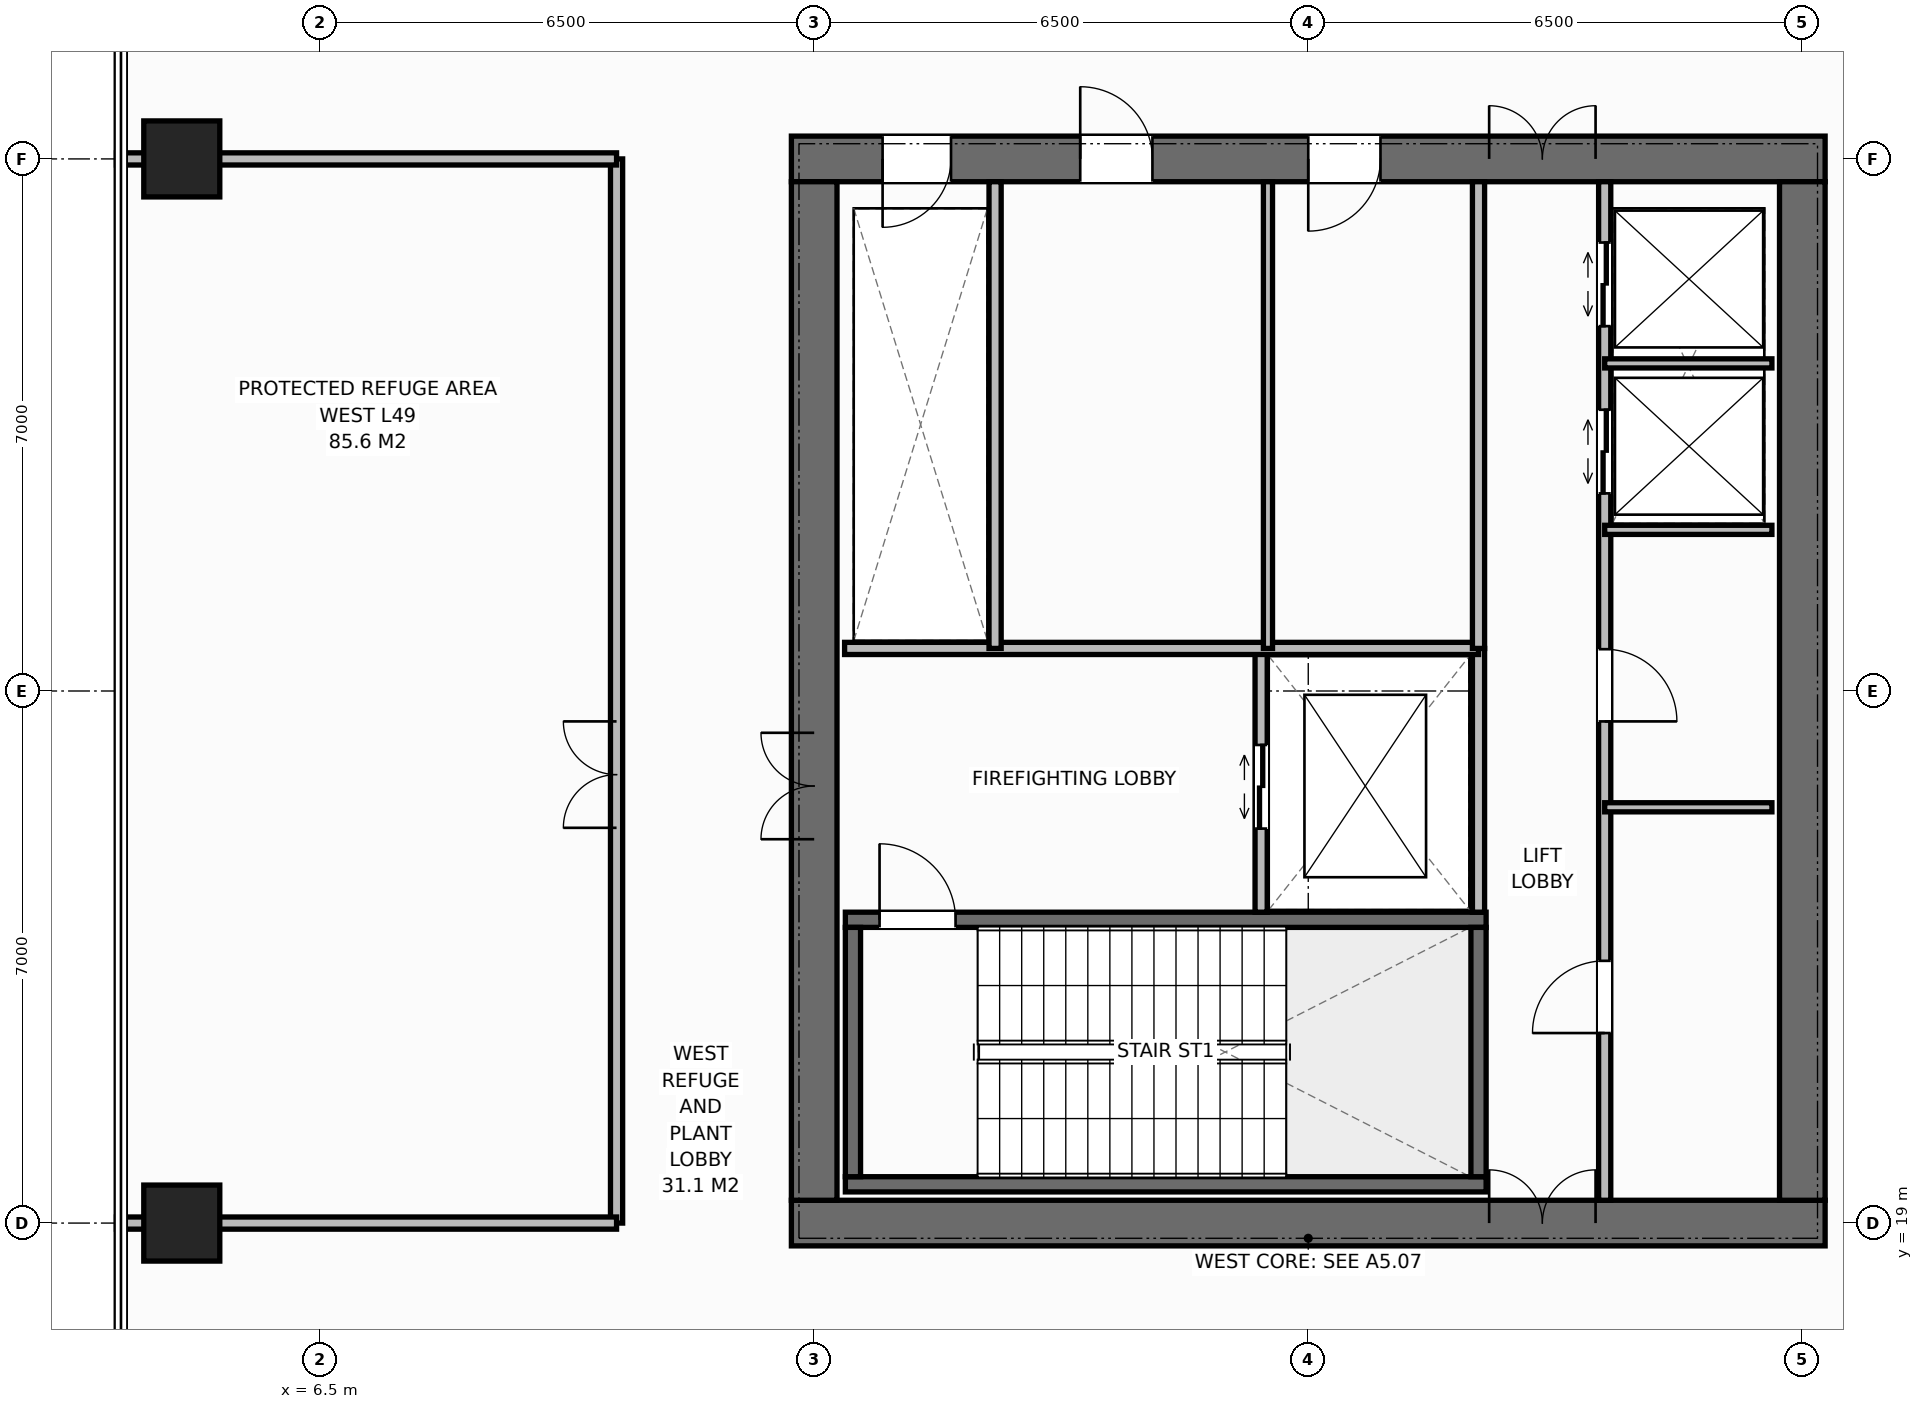
"""IFC4 building model, lengths in metres.
Left out: names, types, materials, properties, quantities, classifications, styles, units other than length and angle.
Written with IfcOpenShell. Run it as: python <this file> out.ifc"""

import sys

from ifc_helpers import new_model, si_unit, direction, frame, frame_2d, origin, origin_2d, place, context, subcontext, project, spatial, rectangle, extrude, element, fill, save


model = new_model("IFC4")
c1 = context("Model", 3, precision=1e-05, world=origin(), true_north=direction((0.0, 1.0)))
c2 = subcontext(c1, "Body", "Model", "MODEL_VIEW")
j1 = project(units=[si_unit("LENGTHUNIT", "METRE"), si_unit("PLANEANGLEUNIT", "RADIAN")], contexts=[c1])
p1 = place(None, origin())
s1 = spatial("IfcSite", under=j1, at=p1, CompositionType="ELEMENT")
p2 = place(p1, origin())
s2 = spatial("IfcBuilding", under=s1, at=p2, CompositionType="ELEMENT")
p3 = place(p2, frame((0.0, 0.0, 197.4)))
s3 = spatial("IfcBuildingStorey", under=s2, at=p3, CompositionType="ELEMENT", Elevation=197.4)
p4 = place(p3, frame((12.7, 19.0, 0.0), z_axis=(0.0, 0.0, 1.0), x_axis=(1.0, 0.0, 0.0)))
e1 = element("IfcWall", 1, at=p4, inside=s3, PredefinedType="SHEAR", context=c2, shape_type="SweptSolid", body=[
    extrude(rectangle(XDim=13.6, YDim=0.6, at=frame_2d((6.8, 0.0))), origin(), (0.0, 0.0, 1.0), 5.0),
])
p5 = place(p4, frame((9.18, 0.0, 0.0)))
e2 = element("IfcOpeningElement", 2, at=p5, cuts=e1, PredefinedType="OPENING", context=c2, shape_type="SweptSolid", body=[
    extrude(rectangle(XDim=1.4, YDim=2.2, at=frame_2d((0.7, 1.1))), frame((0.0, 0.31, 0.0), z_axis=(0.0, -1.0, 0.0), x_axis=(1.0, 0.0, 0.0)), (0.0, 0.0, 1.0), 0.62),
])
p6 = place(p3, frame((12.7, 33.0, 0.0), z_axis=(0.0, 0.0, 1.0), x_axis=(1.0, 0.0, 0.0)))
e3 = element("IfcWall", 3, at=p6, inside=s3, PredefinedType="SHEAR", context=c2, shape_type="SweptSolid", body=[
    extrude(rectangle(XDim=13.6, YDim=0.6, at=frame_2d((6.8, 0.0))), origin(), (0.0, 0.0, 1.0), 5.0),
])
p7 = place(p6, frame((1.2, 0.0, 0.0)))
e4 = element("IfcOpeningElement", 4, at=p7, cuts=e3, PredefinedType="OPENING", context=c2, shape_type="SweptSolid", body=[
    extrude(rectangle(XDim=0.9, YDim=2.15, at=frame_2d((0.45, 1.075))), frame((0.0, 0.31, 0.0), z_axis=(0.0, -1.0, 0.0), x_axis=(1.0, 0.0, 0.0)), (0.0, 0.0, 1.0), 0.62),
])
p8 = place(p6, frame((3.8, 0.0, 0.0)))
e5 = element("IfcOpeningElement", 5, at=p8, cuts=e3, PredefinedType="OPENING", context=c2, shape_type="SweptSolid", body=[
    extrude(rectangle(XDim=0.95, YDim=2.15, at=frame_2d((0.475, 1.075))), frame((0.0, 0.31, 0.0), z_axis=(0.0, -1.0, 0.0), x_axis=(1.0, 0.0, 0.0)), (0.0, 0.0, 1.0), 0.62),
])
p9 = place(p6, frame((6.8, 0.0, 0.0)))
e6 = element("IfcOpeningElement", 6, at=p9, cuts=e3, PredefinedType="OPENING", context=c2, shape_type="SweptSolid", body=[
    extrude(rectangle(XDim=0.95, YDim=2.15, at=frame_2d((0.475, 1.075))), frame((0.0, 0.31, 0.0), z_axis=(0.0, -1.0, 0.0), x_axis=(1.0, 0.0, 0.0)), (0.0, 0.0, 1.0), 0.62),
])
p10 = place(p6, frame((9.18, 0.0, 0.0)))
e7 = element("IfcOpeningElement", 7, at=p10, cuts=e3, PredefinedType="OPENING", context=c2, shape_type="SweptSolid", body=[
    extrude(rectangle(XDim=1.4, YDim=2.2, at=frame_2d((0.7, 1.1))), frame((0.0, 0.31, 0.0), z_axis=(0.0, -1.0, 0.0), x_axis=(1.0, 0.0, 0.0)), (0.0, 0.0, 1.0), 0.62),
])
p11 = place(p3, frame((13.0, 19.3, 0.0), z_axis=(0.0, 0.0, 1.0), x_axis=(0.0, 1.0, 0.0)))
e8 = element("IfcWall", 8, at=p11, inside=s3, PredefinedType="SHEAR", context=c2, shape_type="SweptSolid", body=[
    extrude(rectangle(XDim=13.4, YDim=0.6, at=frame_2d((6.7, 0.0))), origin(), (0.0, 0.0, 1.0), 5.0),
])
p12 = place(p11, frame((4.75, 0.0, 0.0)))
e9 = element("IfcOpeningElement", 9, at=p12, cuts=e8, PredefinedType="OPENING", context=c2, shape_type="SweptSolid", body=[
    extrude(rectangle(XDim=1.4, YDim=2.2, at=frame_2d((0.7, 1.1))), frame((0.0, 0.31, 0.0), z_axis=(0.0, -1.0, 0.0), x_axis=(1.0, 0.0, 0.0)), (0.0, 0.0, 1.0), 0.62),
])
p13 = place(p3, frame((26.0, 19.3, 0.0), z_axis=(0.0, 0.0, 1.0), x_axis=(0.0, 1.0, 0.0)))
e10 = element("IfcWall", 10, at=p13, inside=s3, PredefinedType="SHEAR", context=c2, shape_type="SweptSolid", body=[
    extrude(rectangle(XDim=13.4, YDim=0.6, at=frame_2d((6.7, 0.0))), origin(), (0.0, 0.0, 1.0), 5.0),
])
p14 = place(p3, frame((13.41, 19.51, 0.0), z_axis=(0.0, 0.0, 1.0), x_axis=(1.0, 0.0, 0.0)))
e11 = element("IfcWall", 11, at=p14, inside=s3, PredefinedType="SHEAR", context=c2, shape_type="SweptSolid", body=[
    extrude(rectangle(XDim=8.43, YDim=0.2, at=frame_2d((4.215, 0.0))), origin(), (0.0, 0.0, 1.0), 5.0),
])
p15 = place(p3, frame((13.41, 22.99, 0.0), z_axis=(0.0, 0.0, 1.0), x_axis=(1.0, 0.0, 0.0)))
e12 = element("IfcWall", 12, at=p15, inside=s3, PredefinedType="SHEAR", context=c2, shape_type="SweptSolid", body=[
    extrude(rectangle(XDim=8.43, YDim=0.2, at=frame_2d((4.215, 0.0))), origin(), (0.0, 0.0, 1.0), 5.0),
])
p16 = place(p15, frame((0.45, 0.0, 0.0)))
e13 = element("IfcOpeningElement", 13, at=p16, cuts=e12, PredefinedType="OPENING", context=c2, shape_type="SweptSolid", body=[
    extrude(rectangle(XDim=1.0, YDim=2.15, at=frame_2d((0.5, 1.075))), frame((0.0, 0.11, 0.0), z_axis=(0.0, -1.0, 0.0), x_axis=(1.0, 0.0, 0.0)), (0.0, 0.0, 1.0), 0.22),
])
for number, where, z_axis, x_axis in (
    (14, (13.51, 19.61, 0.0), (0.0, 0.0, 1.0), (0.0, 1.0, 0.0)),
    (15, (21.74, 19.61, 0.0), (0.0, 0.0, 1.0), (0.0, 1.0, 0.0)),
):
    element("IfcWall", number, at=place(p3, frame(where, z_axis=z_axis, x_axis=x_axis)), inside=s3, PredefinedType="SHEAR", context=c2, shape_type="SweptSolid", body=[
        extrude(rectangle(XDim=3.28, YDim=0.2, at=frame_2d((1.64, 0.0))), origin(), (0.0, 0.0, 1.0), 5.0),
    ])
for number, where, z_axis, x_axis in (
    (16, (4.68, 19.0, 0.0), (0.0, 0.0, 1.0), (1.0, 0.0, 0.0)),
    (17, (4.68, 33.0, 0.0), (0.0, 0.0, 1.0), (1.0, 0.0, 0.0)),
):
    element("IfcColumn", number, at=place(p3, frame(where, z_axis=z_axis, x_axis=x_axis)), inside=s3, PredefinedType="COLUMN", context=c2, shape_type="SweptSolid", body=[
        extrude(rectangle(XDim=1.0, YDim=1.0, at=origin_2d()), origin(), (0.0, 0.0, 1.0), 5.0),
    ])
p17 = place(p3, frame((21.74, 23.09, 0.0), z_axis=(0.0, 0.0, 1.0), x_axis=(0.0, 1.0, 0.0)))
e18 = element("IfcWall", 18, at=p17, inside=s3, PredefinedType="STANDARD", context=c2, shape_type="SweptSolid", body=[
    extrude(rectangle(XDim=3.47, YDim=0.16, at=frame_2d((1.735, 0.0))), origin(), (0.0, 0.0, 1.0), 4.78),
])
p18 = place(p3, frame((18.88, 23.09, 0.0), z_axis=(0.0, 0.0, 1.0), x_axis=(0.0, 1.0, 0.0)))
e19 = element("IfcWall", 19, at=p18, inside=s3, PredefinedType="STANDARD", context=c2, shape_type="SweptSolid", body=[
    extrude(rectangle(XDim=3.47, YDim=0.16, at=frame_2d((1.735, 0.0))), origin(), (0.0, 0.0, 1.0), 4.78),
])
p19 = place(p18, frame((1.1, 0.0, 0.0)))
e20 = element("IfcOpeningElement", 20, at=p19, cuts=e19, PredefinedType="OPENING", context=c2, shape_type="SweptSolid", body=[
    extrude(rectangle(XDim=1.1, YDim=2.2, at=frame_2d((0.55, 1.1))), frame((0.0, 0.09, 0.0), z_axis=(0.0, -1.0, 0.0), x_axis=(1.0, 0.0, 0.0)), (0.0, 0.0, 1.0), 0.18),
])
p20 = place(p3, frame((13.4, 26.56, 0.0), z_axis=(0.0, 0.0, 1.0), x_axis=(1.0, 0.0, 0.0)))
e21 = element("IfcWall", 21, at=p20, inside=s3, PredefinedType="STANDARD", context=c2, shape_type="SweptSolid", body=[
    extrude(rectangle(XDim=8.34, YDim=0.16, at=frame_2d((4.17, 0.0))), origin(), (0.0, 0.0, 1.0), 4.78),
])
p21 = place(p3, frame((15.38, 26.56, 0.0), z_axis=(0.0, 0.0, 1.0), x_axis=(0.0, 1.0, 0.0)))
e22 = element("IfcWall", 22, at=p21, inside=s3, PredefinedType="STANDARD", context=c2, shape_type="SweptSolid", body=[
    extrude(rectangle(XDim=6.14, YDim=0.16, at=frame_2d((3.07, 0.0))), origin(), (0.0, 0.0, 1.0), 4.78),
])
p22 = place(p3, frame((18.97, 26.56, 0.0), z_axis=(0.0, 0.0, 1.0), x_axis=(0.0, 1.0, 0.0)))
e23 = element("IfcWall", 23, at=p22, inside=s3, PredefinedType="PARTITIONING", context=c2, shape_type="SweptSolid", body=[
    extrude(rectangle(XDim=6.14, YDim=0.12, at=frame_2d((3.07, 0.0))), origin(), (0.0, 0.0, 1.0), 4.78),
])
p23 = place(p3, frame((21.74, 26.56, 0.0), z_axis=(0.0, 0.0, 1.0), x_axis=(0.0, 1.0, 0.0)))
e24 = element("IfcWall", 24, at=p23, inside=s3, PredefinedType="STANDARD", context=c2, shape_type="SweptSolid", body=[
    extrude(rectangle(XDim=6.14, YDim=0.16, at=frame_2d((3.07, 0.0))), origin(), (0.0, 0.0, 1.0), 4.78),
])
p24 = place(p3, frame((23.4, 19.3, 0.0), z_axis=(0.0, 0.0, 1.0), x_axis=(0.0, 1.0, 0.0)))
e25 = element("IfcWall", 25, at=p24, inside=s3, PredefinedType="STANDARD", context=c2, shape_type="SweptSolid", body=[
    extrude(rectangle(XDim=13.4, YDim=0.16, at=frame_2d((6.7, 0.0))), origin(), (0.0, 0.0, 1.0), 4.78),
])
p25 = place(p24, frame((2.2, 0.0, 0.0)))
e26 = element("IfcOpeningElement", 26, at=p25, cuts=e25, PredefinedType="OPENING", context=c2, shape_type="SweptSolid", body=[
    extrude(rectangle(XDim=0.95, YDim=2.15, at=frame_2d((0.475, 1.075))), frame((0.0, 0.09, 0.0), z_axis=(0.0, -1.0, 0.0), x_axis=(1.0, 0.0, 0.0)), (0.0, 0.0, 1.0), 0.18),
])
p26 = place(p24, frame((6.3, 0.0, 0.0)))
e27 = element("IfcOpeningElement", 27, at=p26, cuts=e25, PredefinedType="OPENING", context=c2, shape_type="SweptSolid", body=[
    extrude(rectangle(XDim=0.95, YDim=2.15, at=frame_2d((0.475, 1.075))), frame((0.0, 0.09, 0.0), z_axis=(0.0, -1.0, 0.0), x_axis=(1.0, 0.0, 0.0)), (0.0, 0.0, 1.0), 0.18),
])
p27 = place(p24, frame((9.3, 0.0, 0.0)))
e28 = element("IfcOpeningElement", 28, at=p27, cuts=e25, PredefinedType="OPENING", context=c2, shape_type="SweptSolid", body=[
    extrude(rectangle(XDim=1.1, YDim=2.2, at=frame_2d((0.55, 1.1))), frame((0.0, 0.09, 0.0), z_axis=(0.0, -1.0, 0.0), x_axis=(1.0, 0.0, 0.0)), (0.0, 0.0, 1.0), 0.18),
])
p28 = place(p24, frame((11.5, 0.0, 0.0)))
e29 = element("IfcOpeningElement", 29, at=p28, cuts=e25, PredefinedType="OPENING", context=c2, shape_type="SweptSolid", body=[
    extrude(rectangle(XDim=1.1, YDim=2.2, at=frame_2d((0.55, 1.1))), frame((0.0, 0.09, 0.0), z_axis=(0.0, -1.0, 0.0), x_axis=(1.0, 0.0, 0.0)), (0.0, 0.0, 1.0), 0.18),
])
for number, where, z_axis, x_axis in (
    (30, (23.4, 24.47, 0.0), (0.0, 0.0, 1.0), (1.0, 0.0, 0.0)),
    (31, (23.4, 28.12, 0.0), (0.0, 0.0, 1.0), (1.0, 0.0, 0.0)),
    (32, (23.4, 30.31, 0.0), (0.0, 0.0, 1.0), (1.0, 0.0, 0.0)),
):
    element("IfcWall", number, at=place(p3, frame(where, z_axis=z_axis, x_axis=x_axis)), inside=s3, PredefinedType="PARTITIONING", context=c2, shape_type="SweptSolid", body=[
        extrude(rectangle(XDim=2.2, YDim=0.12, at=frame_2d((1.1, 0.0))), origin(), (0.0, 0.0, 1.0), 4.78),
    ])
p29 = place(p3, frame((10.4, 19.0, 0.0), z_axis=(0.0, 0.0, 1.0), x_axis=(0.0, 1.0, 0.0)))
e33 = element("IfcWall", 33, at=p29, inside=s3, PredefinedType="STANDARD", context=c2, shape_type="SweptSolid", body=[
    extrude(rectangle(XDim=14.0, YDim=0.16, at=frame_2d((7.0, 0.0))), origin(), (0.0, 0.0, 1.0), 4.78),
])
p30 = place(p29, frame((5.2, 0.0, 0.0)))
e34 = element("IfcOpeningElement", 34, at=p30, cuts=e33, PredefinedType="OPENING", context=c2, shape_type="SweptSolid", body=[
    extrude(rectangle(XDim=1.4, YDim=2.2, at=frame_2d((0.7, 1.1))), frame((0.0, 0.09, 0.0), z_axis=(0.0, -1.0, 0.0), x_axis=(1.0, 0.0, 0.0)), (0.0, 0.0, 1.0), 0.18),
])
for number, where, z_axis, x_axis in (
    (35, (3.82, 19.0, 0.0), (0.0, 0.0, 1.0), (1.0, 0.0, 0.0)),
    (36, (3.82, 33.0, 0.0), (0.0, 0.0, 1.0), (1.0, 0.0, 0.0)),
):
    element("IfcWall", number, at=place(p3, frame(where, z_axis=z_axis, x_axis=x_axis)), inside=s3, PredefinedType="STANDARD", context=c2, shape_type="SweptSolid", body=[
        extrude(rectangle(XDim=6.58, YDim=0.16, at=frame_2d((3.29, 0.0))), origin(), (0.0, 0.0, 1.0), 3.26),
    ])
p31 = place(p16, origin())
e37 = element("IfcDoor", 37, at=p31, inside=s3, OperationType="SINGLE_SWING_LEFT", PredefinedType="DOOR", context=c2, shape_type="SweptSolid", body=[
    extrude(rectangle(XDim=1.0, YDim=2.15, at=frame_2d((0.5, 1.075))), frame((0.0, 0.025, 0.0), z_axis=(0.0, -1.0, 0.0), x_axis=(1.0, 0.0, 0.0)), (0.0, 0.0, 1.0), 0.05),
])
fill(e13, e37)
p32 = place(p12, origin())
e38 = element("IfcDoor", 38, at=p32, inside=s3, OperationType="DOUBLE_DOOR_SINGLE_SWING", PredefinedType="DOOR", context=c2, shape_type="SweptSolid", body=[
    extrude(rectangle(XDim=1.4, YDim=2.2, at=frame_2d((0.7, 1.1))), frame((0.0, 0.025, 0.0), z_axis=(0.0, -1.0, 0.0), x_axis=(1.0, 0.0, 0.0)), (0.0, 0.0, 1.0), 0.05),
])
fill(e9, e38)
p33 = place(p19, origin())
e39 = element("IfcDoor", 39, at=p33, inside=s3, OperationType="DOUBLE_DOOR_SLIDING", PredefinedType="DOOR", context=c2, shape_type="SweptSolid", body=[
    extrude(rectangle(XDim=1.1, YDim=2.2, at=frame_2d((0.55, 1.1))), frame((0.0, 0.025, 0.0), z_axis=(0.0, -1.0, 0.0), x_axis=(1.0, 0.0, 0.0)), (0.0, 0.0, 1.0), 0.05),
])
fill(e20, e39)
p34 = place(p7, origin())
e40 = element("IfcDoor", 40, at=p34, inside=s3, OperationType="SINGLE_SWING_RIGHT", PredefinedType="DOOR", context=c2, shape_type="SweptSolid", body=[
    extrude(rectangle(XDim=0.9, YDim=2.15, at=frame_2d((0.45, 1.075))), frame((0.0, -0.025, 0.0), z_axis=(0.0, -1.0, 0.0), x_axis=(1.0, 0.0, 0.0)), (0.0, 0.0, 1.0), 0.05),
])
fill(e4, e40)
p35 = place(p8, origin())
e41 = element("IfcDoor", 41, at=p35, inside=s3, OperationType="SINGLE_SWING_LEFT", PredefinedType="DOOR", context=c2, shape_type="SweptSolid", body=[
    extrude(rectangle(XDim=0.95, YDim=2.15, at=frame_2d((0.475, 1.075))), frame((0.0, -0.025, 0.0), z_axis=(0.0, -1.0, 0.0), x_axis=(1.0, 0.0, 0.0)), (0.0, 0.0, 1.0), 0.05),
])
fill(e5, e41)
p36 = place(p9, origin())
e42 = element("IfcDoor", 42, at=p36, inside=s3, OperationType="SINGLE_SWING_RIGHT", PredefinedType="DOOR", context=c2, shape_type="SweptSolid", body=[
    extrude(rectangle(XDim=0.95, YDim=2.15, at=frame_2d((0.475, 1.075))), frame((0.0, -0.025, 0.0), z_axis=(0.0, -1.0, 0.0), x_axis=(1.0, 0.0, 0.0)), (0.0, 0.0, 1.0), 0.05),
])
fill(e6, e42)
p37 = place(p5, origin())
e43 = element("IfcDoor", 43, at=p37, inside=s3, OperationType="DOUBLE_DOOR_SINGLE_SWING", PredefinedType="DOOR", context=c2, shape_type="SweptSolid", body=[
    extrude(rectangle(XDim=1.4, YDim=2.2, at=frame_2d((0.7, 1.1))), frame((0.0, 0.075, 0.0), z_axis=(0.0, -1.0, 0.0), x_axis=(1.0, 0.0, 0.0)), (0.0, 0.0, 1.0), 0.05),
])
fill(e2, e43)
p38 = place(p10, origin())
e44 = element("IfcDoor", 44, at=p38, inside=s3, OperationType="DOUBLE_DOOR_SINGLE_SWING", PredefinedType="DOOR", context=c2, shape_type="SweptSolid", body=[
    extrude(rectangle(XDim=1.4, YDim=2.2, at=frame_2d((0.7, 1.1))), frame((0.0, -0.025, 0.0), z_axis=(0.0, -1.0, 0.0), x_axis=(1.0, 0.0, 0.0)), (0.0, 0.0, 1.0), 0.05),
])
fill(e7, e44)
p39 = place(p25, origin())
e45 = element("IfcDoor", 45, at=p39, inside=s3, OperationType="SINGLE_SWING_LEFT", PredefinedType="DOOR", context=c2, shape_type="SweptSolid", body=[
    extrude(rectangle(XDim=0.95, YDim=2.15, at=frame_2d((0.475, 1.075))), frame((0.0, 0.025, 0.0), z_axis=(0.0, -1.0, 0.0), x_axis=(1.0, 0.0, 0.0)), (0.0, 0.0, 1.0), 0.05),
])
fill(e26, e45)
p40 = place(p26, origin())
e46 = element("IfcDoor", 46, at=p40, inside=s3, OperationType="SINGLE_SWING_RIGHT", PredefinedType="DOOR", context=c2, shape_type="SweptSolid", body=[
    extrude(rectangle(XDim=0.95, YDim=2.15, at=frame_2d((0.475, 1.075))), frame((0.0, 0.025, 0.0), z_axis=(0.0, -1.0, 0.0), x_axis=(1.0, 0.0, 0.0)), (0.0, 0.0, 1.0), 0.05),
])
fill(e27, e46)
p41 = place(p27, origin())
e47 = element("IfcDoor", 47, at=p41, inside=s3, OperationType="DOUBLE_DOOR_SLIDING", PredefinedType="DOOR", context=c2, shape_type="SweptSolid", body=[
    extrude(rectangle(XDim=1.1, YDim=2.2, at=frame_2d((0.55, 1.1))), frame((0.0, 0.025, 0.0), z_axis=(0.0, -1.0, 0.0), x_axis=(1.0, 0.0, 0.0)), (0.0, 0.0, 1.0), 0.05),
])
fill(e28, e47)
p42 = place(p28, origin())
e48 = element("IfcDoor", 48, at=p42, inside=s3, OperationType="DOUBLE_DOOR_SLIDING", PredefinedType="DOOR", context=c2, shape_type="SweptSolid", body=[
    extrude(rectangle(XDim=1.1, YDim=2.2, at=frame_2d((0.55, 1.1))), frame((0.0, 0.025, 0.0), z_axis=(0.0, -1.0, 0.0), x_axis=(1.0, 0.0, 0.0)), (0.0, 0.0, 1.0), 0.05),
])
fill(e29, e48)
p43 = place(p30, origin())
e49 = element("IfcDoor", 49, at=p43, inside=s3, OperationType="DOUBLE_DOOR_SINGLE_SWING", PredefinedType="DOOR", context=c2, shape_type="SweptSolid", body=[
    extrude(rectangle(XDim=1.4, YDim=2.2, at=frame_2d((0.7, 1.1))), frame((0.0, 0.025, 0.0), z_axis=(0.0, -1.0, 0.0), x_axis=(1.0, 0.0, 0.0)), (0.0, 0.0, 1.0), 0.05),
])
fill(e34, e49)
save(model, sys.argv[1])
